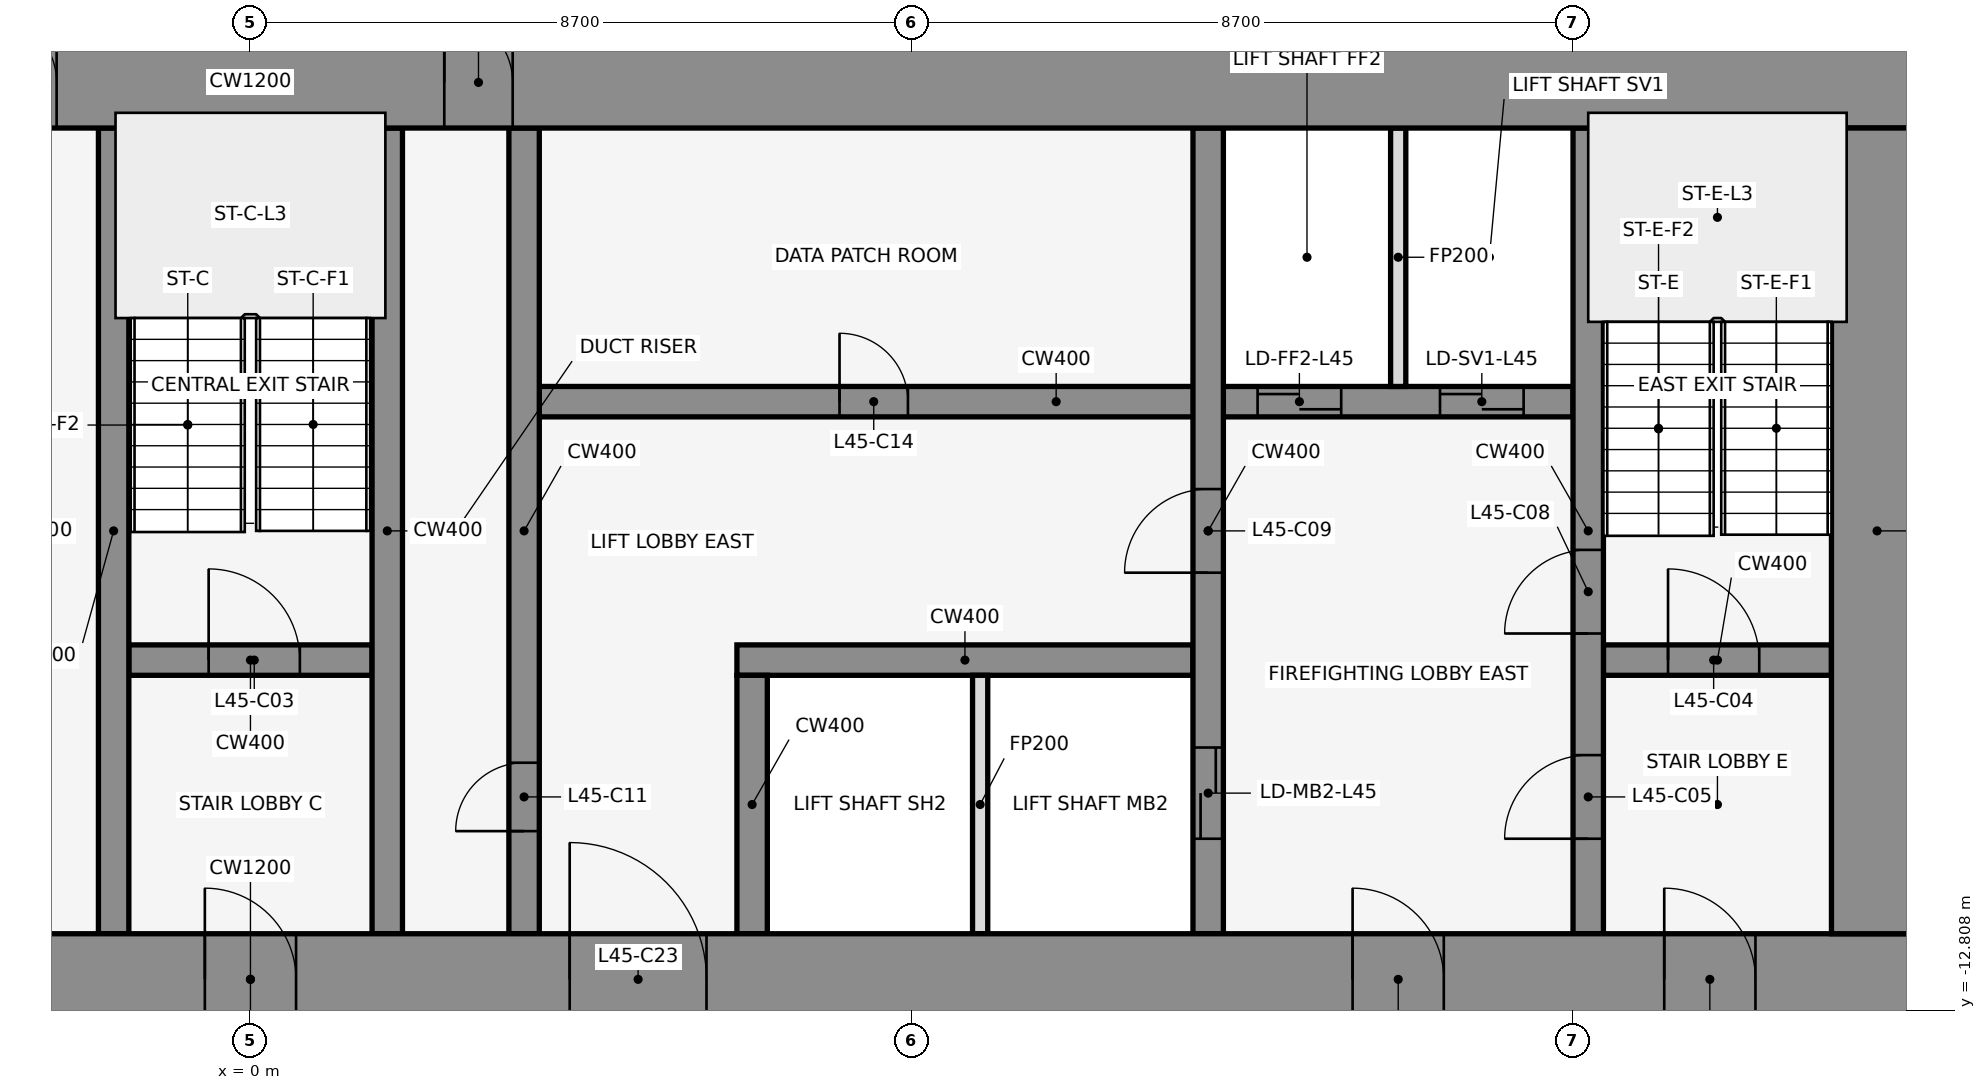
"""IFC4 building model, lengths in metres.
Left out: names, types, materials, properties, quantities, classifications, styles, units other than length and angle.
Written with IfcOpenShell. Run it as: python <this file> out.ifc"""

import sys

from ifc_helpers import new_model, si_unit, direction, frame, frame_2d, origin, place, context, subcontext, project, spatial, rectangle, extrude, element, fill, save


model = new_model("IFC4")
c1 = context("Model", 3, precision=1e-05, world=origin(), true_north=direction((0.0, 1.0)))
c2 = subcontext(c1, "Body", "Model", "MODEL_VIEW")
j1 = project(units=[si_unit("LENGTHUNIT", "METRE"), si_unit("PLANEANGLEUNIT", "RADIAN")], contexts=[c1])
p1 = place(None, origin())
s1 = spatial("IfcSite", under=j1, at=p1, CompositionType="ELEMENT")
p2 = place(p1, origin())
s2 = spatial("IfcBuilding", under=s1, at=p2, CompositionType="ELEMENT")
p3 = place(p2, frame((0.0, 0.0, 203.2)))
s3 = spatial("IfcBuildingStorey", under=s2, at=p3, CompositionType="ELEMENT", Elevation=203.2)
for number, where, z_axis, x_axis in (
    (1, (16.432, -0.105, 0.0), (0.0, 0.0, 1.0), (-0.84, 0.543, 0.0)),
    (2, (1.901, 1.08, 0.0), (0.0, 0.0, 1.0), (-0.84, -0.543, 0.0)),
    (3, (-0.068, -0.105, 0.0), (0.0, 0.0, 1.0), (-0.84, 0.543, 0.0)),
):
    element("IfcWall", number, at=place(p3, frame(where, z_axis=z_axis, x_axis=x_axis)), inside=s3, PredefinedType="STANDARD", context=c2, shape_type="SweptSolid", body=[
        extrude(rectangle(XDim=2.183, YDim=0.25, at=frame_2d((1.091, 0.0))), origin(), (0.0, 0.0, 1.0), 3.95),
    ])
p4 = place(p3, frame((-1.6, -8.2, 0.0), z_axis=(0.0, 0.0, 1.0), x_axis=(1.0, 0.0, 0.0)))
e4 = element("IfcWall", 4, at=p4, inside=s3, PredefinedType="SHEAR", context=c2, shape_type="SweptSolid", body=[
    extrude(rectangle(XDim=3.2, YDim=0.4, at=frame_2d((1.6, 0.0))), origin(), (0.0, 0.0, 1.0), 4.1),
])
p5 = place(p4, frame((1.05, 0.0, 0.0)))
e5 = element("IfcOpeningElement", 5, at=p5, cuts=e4, PredefinedType="OPENING", context=c2, shape_type="SweptSolid", body=[
    extrude(rectangle(XDim=1.2, YDim=2.1, at=frame_2d((0.6, 1.05))), frame((0.0, 0.212, 0.0), z_axis=(0.0, -1.0, 0.0), x_axis=(1.0, 0.0, 0.0)), (0.0, 0.0, 1.0), 0.424),
])
p6 = place(p3, frame((6.4, -8.2, 0.0), z_axis=(0.0, 0.0, 1.0), x_axis=(1.0, 0.0, 0.0)))
e6 = element("IfcWall", 6, at=p6, inside=s3, PredefinedType="SHEAR", context=c2, shape_type="SweptSolid", body=[
    extrude(rectangle(XDim=6.0, YDim=0.4, at=frame_2d((3.0, 0.0))), origin(), (0.0, 0.0, 1.0), 4.1),
])
p7 = place(p3, frame((17.8, -8.2, 0.0), z_axis=(0.0, 0.0, 1.0), x_axis=(1.0, 0.0, 0.0)))
e7 = element("IfcWall", 7, at=p7, inside=s3, PredefinedType="SHEAR", context=c2, shape_type="SweptSolid", body=[
    extrude(rectangle(XDim=3.0, YDim=0.4, at=frame_2d((1.5, 0.0))), origin(), (0.0, 0.0, 1.0), 4.1),
])
p8 = place(p7, frame((0.85, 0.0, 0.0)))
e8 = element("IfcOpeningElement", 8, at=p8, cuts=e7, PredefinedType="OPENING", context=c2, shape_type="SweptSolid", body=[
    extrude(rectangle(XDim=1.2, YDim=2.1, at=frame_2d((0.6, 1.05))), frame((0.0, 0.212, 0.0), z_axis=(0.0, -1.0, 0.0), x_axis=(1.0, 0.0, 0.0)), (0.0, 0.0, 1.0), 0.424),
])
p9 = place(p3, frame((3.8, -4.8, 0.0), z_axis=(0.0, 0.0, 1.0), x_axis=(1.0, 0.0, 0.0)))
e9 = element("IfcWall", 9, at=p9, inside=s3, PredefinedType="SHEAR", context=c2, shape_type="SweptSolid", body=[
    extrude(rectangle(XDim=13.6, YDim=0.4, at=frame_2d((6.8, 0.0))), origin(), (0.0, 0.0, 1.0), 4.1),
])
p10 = place(p9, frame((9.45, 0.0, 0.0)))
e10 = element("IfcOpeningElement", 10, at=p10, cuts=e9, PredefinedType="OPENING", context=c2, shape_type="SweptSolid", body=[
    extrude(rectangle(XDim=1.1, YDim=2.1, at=frame_2d((0.55, 1.05))), frame((0.0, 0.212, 0.0), z_axis=(0.0, -1.0, 0.0), x_axis=(1.0, 0.0, 0.0)), (0.0, 0.0, 1.0), 0.424),
])
p11 = place(p9, frame((11.85, 0.0, 0.0)))
e11 = element("IfcOpeningElement", 11, at=p11, cuts=e9, PredefinedType="OPENING", context=c2, shape_type="SweptSolid", body=[
    extrude(rectangle(XDim=1.1, YDim=2.1, at=frame_2d((0.55, 1.05))), frame((0.0, 0.212, 0.0), z_axis=(0.0, -1.0, 0.0), x_axis=(1.0, 0.0, 0.0)), (0.0, 0.0, 1.0), 0.424),
])
p12 = place(p9, frame((3.95, 0.0, 0.0)))
e12 = element("IfcOpeningElement", 12, at=p12, cuts=e9, PredefinedType="OPENING", context=c2, shape_type="SweptSolid", body=[
    extrude(rectangle(XDim=0.9, YDim=2.1, at=frame_2d((0.45, 1.05))), frame((0.0, 0.212, 0.0), z_axis=(0.0, -1.0, 0.0), x_axis=(1.0, 0.0, 0.0)), (0.0, 0.0, 1.0), 0.424),
])
for number, where, z_axis, x_axis in (
    (13, (-1.8, -11.8, 0.0), (0.0, 0.0, 1.0), (0.0, 1.0, 0.0)),
    (14, (1.8, -11.8, 0.0), (0.0, 0.0, 1.0), (0.0, 1.0, 0.0)),
):
    element("IfcWall", number, at=place(p3, frame(where, z_axis=z_axis, x_axis=x_axis)), inside=s3, PredefinedType="SHEAR", context=c2, shape_type="SweptSolid", body=[
        extrude(rectangle(XDim=10.6, YDim=0.4, at=frame_2d((5.3, 0.0))), origin(), (0.0, 0.0, 1.0), 4.1),
    ])
p13 = place(p3, frame((3.6, -11.8, 0.0), z_axis=(0.0, 0.0, 1.0), x_axis=(0.0, 1.0, 0.0)))
e15 = element("IfcWall", 15, at=p13, inside=s3, PredefinedType="SHEAR", context=c2, shape_type="SweptSolid", body=[
    extrude(rectangle(XDim=10.6, YDim=0.4, at=frame_2d((5.3, 0.0))), origin(), (0.0, 0.0, 1.0), 4.1),
])
p14 = place(p13, frame((1.35, 0.0, 0.0)))
e16 = element("IfcOpeningElement", 16, at=p14, cuts=e15, PredefinedType="OPENING", context=c2, shape_type="SweptSolid", body=[
    extrude(rectangle(XDim=0.9, YDim=2.1, at=frame_2d((0.45, 1.05))), frame((0.0, 0.212, 0.0), z_axis=(0.0, -1.0, 0.0), x_axis=(1.0, 0.0, 0.0)), (0.0, 0.0, 1.0), 0.424),
])
p15 = place(p3, frame((6.6, -11.8, 0.0), z_axis=(0.0, 0.0, 1.0), x_axis=(0.0, 1.0, 0.0)))
e17 = element("IfcWall", 17, at=p15, inside=s3, PredefinedType="SHEAR", context=c2, shape_type="SweptSolid", body=[
    extrude(rectangle(XDim=3.4, YDim=0.4, at=frame_2d((1.7, 0.0))), origin(), (0.0, 0.0, 1.0), 4.1),
])
p16 = place(p3, frame((9.6, -11.8, 0.0), z_axis=(0.0, 0.0, 1.0), x_axis=(0.0, 1.0, 0.0)))
e18 = element("IfcWall", 18, at=p16, inside=s3, PredefinedType="PARTITIONING", context=c2, shape_type="SweptSolid", body=[
    extrude(rectangle(XDim=3.4, YDim=0.2, at=frame_2d((1.7, 0.0))), origin(), (0.0, 0.0, 1.0), 2.84),
])
p17 = place(p3, frame((12.6, -11.8, 0.0), z_axis=(0.0, 0.0, 1.0), x_axis=(0.0, 1.0, 0.0)))
e19 = element("IfcWall", 19, at=p17, inside=s3, PredefinedType="SHEAR", context=c2, shape_type="SweptSolid", body=[
    extrude(rectangle(XDim=10.6, YDim=0.4, at=frame_2d((5.3, 0.0))), origin(), (0.0, 0.0, 1.0), 4.1),
])
p18 = place(p17, frame((1.25, 0.0, 0.0)))
e20 = element("IfcOpeningElement", 20, at=p18, cuts=e19, PredefinedType="OPENING", context=c2, shape_type="SweptSolid", body=[
    extrude(rectangle(XDim=1.2, YDim=2.1, at=frame_2d((0.6, 1.05))), frame((0.0, 0.212, 0.0), z_axis=(0.0, -1.0, 0.0), x_axis=(1.0, 0.0, 0.0)), (0.0, 0.0, 1.0), 0.424),
])
p19 = place(p17, frame((4.75, 0.0, 0.0)))
e21 = element("IfcOpeningElement", 21, at=p19, cuts=e19, PredefinedType="OPENING", context=c2, shape_type="SweptSolid", body=[
    extrude(rectangle(XDim=1.1, YDim=2.1, at=frame_2d((0.55, 1.05))), frame((0.0, 0.212, 0.0), z_axis=(0.0, -1.0, 0.0), x_axis=(1.0, 0.0, 0.0)), (0.0, 0.0, 1.0), 0.424),
])
p20 = place(p3, frame((15.1, -4.6, 0.0), z_axis=(0.0, 0.0, 1.0), x_axis=(0.0, 1.0, 0.0)))
e22 = element("IfcWall", 22, at=p20, inside=s3, PredefinedType="PARTITIONING", context=c2, shape_type="SweptSolid", body=[
    extrude(rectangle(XDim=3.4, YDim=0.2, at=frame_2d((1.7, 0.0))), origin(), (0.0, 0.0, 1.0), 2.84),
])
p21 = place(p3, frame((17.6, -11.8, 0.0), z_axis=(0.0, 0.0, 1.0), x_axis=(0.0, 1.0, 0.0)))
e23 = element("IfcWall", 23, at=p21, inside=s3, PredefinedType="SHEAR", context=c2, shape_type="SweptSolid", body=[
    extrude(rectangle(XDim=10.6, YDim=0.4, at=frame_2d((5.3, 0.0))), origin(), (0.0, 0.0, 1.0), 4.1),
])
p22 = place(p21, frame((1.25, 0.0, 0.0)))
e24 = element("IfcOpeningElement", 24, at=p22, cuts=e23, PredefinedType="OPENING", context=c2, shape_type="SweptSolid", body=[
    extrude(rectangle(XDim=1.1, YDim=2.1, at=frame_2d((0.55, 1.05))), frame((0.0, 0.212, 0.0), z_axis=(0.0, -1.0, 0.0), x_axis=(1.0, 0.0, 0.0)), (0.0, 0.0, 1.0), 0.424),
])
p23 = place(p21, frame((3.95, 0.0, 0.0)))
e25 = element("IfcOpeningElement", 25, at=p23, cuts=e23, PredefinedType="OPENING", context=c2, shape_type="SweptSolid", body=[
    extrude(rectangle(XDim=1.1, YDim=2.1, at=frame_2d((0.55, 1.05))), frame((0.0, 0.212, 0.0), z_axis=(0.0, -1.0, 0.0), x_axis=(1.0, 0.0, 0.0)), (0.0, 0.0, 1.0), 0.424),
])
p24 = place(p3, frame((-22.0, -0.6, 0.0), z_axis=(0.0, 0.0, 1.0), x_axis=(1.0, 0.0, 0.0)))
e26 = element("IfcWall", 26, at=p24, inside=s3, PredefinedType="SHEAR", context=c2, shape_type="SweptSolid", body=[
    extrude(rectangle(XDim=44.0, YDim=1.2, at=frame_2d((22.0, 0.0))), origin(), (0.0, 0.0, 1.0), 4.1),
])
p25 = place(p24, frame((18.55, 0.0, 0.0)))
e27 = element("IfcOpeningElement", 27, at=p25, cuts=e26, PredefinedType="OPENING", context=c2, shape_type="SweptSolid", body=[
    extrude(rectangle(XDim=0.9, YDim=2.1, at=frame_2d((0.45, 1.05))), frame((0.0, 0.612, 0.0), z_axis=(0.0, -1.0, 0.0), x_axis=(1.0, 0.0, 0.0)), (0.0, 0.0, 1.0), 1.224),
])
p26 = place(p24, frame((24.55, 0.0, 0.0)))
e28 = element("IfcOpeningElement", 28, at=p26, cuts=e26, PredefinedType="OPENING", context=c2, shape_type="SweptSolid", body=[
    extrude(rectangle(XDim=0.9, YDim=2.1, at=frame_2d((0.45, 1.05))), frame((0.0, 0.612, 0.0), z_axis=(0.0, -1.0, 0.0), x_axis=(1.0, 0.0, 0.0)), (0.0, 0.0, 1.0), 1.224),
])
p27 = place(p3, frame((-22.0, -12.4, 0.0), z_axis=(0.0, 0.0, 1.0), x_axis=(1.0, 0.0, 0.0)))
e29 = element("IfcWall", 29, at=p27, inside=s3, PredefinedType="SHEAR", context=c2, shape_type="SweptSolid", body=[
    extrude(rectangle(XDim=44.0, YDim=1.2, at=frame_2d((22.0, 0.0))), origin(), (0.0, 0.0, 1.0), 4.1),
])
p28 = place(p27, frame((2.2, 0.0, 0.0)))
e30 = element("IfcOpeningElement", 30, at=p28, cuts=e29, PredefinedType="OPENING", context=c2, shape_type="SweptSolid", body=[
    extrude(rectangle(XDim=1.2, YDim=2.1, at=frame_2d((0.6, 1.05))), frame((0.0, 0.612, 0.0), z_axis=(0.0, -1.0, 0.0), x_axis=(1.0, 0.0, 0.0)), (0.0, 0.0, 1.0), 1.224),
])
p29 = place(p27, frame((21.4, 0.0, 0.0)))
e31 = element("IfcOpeningElement", 31, at=p29, cuts=e29, PredefinedType="OPENING", context=c2, shape_type="SweptSolid", body=[
    extrude(rectangle(XDim=1.2, YDim=2.1, at=frame_2d((0.6, 1.05))), frame((0.0, 0.612, 0.0), z_axis=(0.0, -1.0, 0.0), x_axis=(1.0, 0.0, 0.0)), (0.0, 0.0, 1.0), 1.224),
])
p30 = place(p27, frame((40.6, 0.0, 0.0)))
e32 = element("IfcOpeningElement", 32, at=p30, cuts=e29, PredefinedType="OPENING", context=c2, shape_type="SweptSolid", body=[
    extrude(rectangle(XDim=1.2, YDim=2.1, at=frame_2d((0.6, 1.05))), frame((0.0, 0.612, 0.0), z_axis=(0.0, -1.0, 0.0), x_axis=(1.0, 0.0, 0.0)), (0.0, 0.0, 1.0), 1.224),
])
p31 = place(p27, frame((16.0, 0.0, 0.0)))
e33 = element("IfcOpeningElement", 33, at=p31, cuts=e29, PredefinedType="OPENING", context=c2, shape_type="SweptSolid", body=[
    extrude(rectangle(XDim=1.8, YDim=2.1, at=frame_2d((0.9, 1.05))), frame((0.0, 0.612, 0.0), z_axis=(0.0, -1.0, 0.0), x_axis=(1.0, 0.0, 0.0)), (0.0, 0.0, 1.0), 1.224),
])
p32 = place(p27, frame((6.3, 0.0, 0.0)))
e34 = element("IfcOpeningElement", 34, at=p32, cuts=e29, PredefinedType="OPENING", context=c2, shape_type="SweptSolid", body=[
    extrude(rectangle(XDim=1.2, YDim=2.1, at=frame_2d((0.6, 1.05))), frame((0.0, 0.612, 0.0), z_axis=(0.0, -1.0, 0.0), x_axis=(1.0, 0.0, 0.0)), (0.0, 0.0, 1.0), 1.224),
])
p33 = place(p27, frame((26.2, 0.0, 0.0)))
e35 = element("IfcOpeningElement", 35, at=p33, cuts=e29, PredefinedType="OPENING", context=c2, shape_type="SweptSolid", body=[
    extrude(rectangle(XDim=1.8, YDim=2.1, at=frame_2d((0.9, 1.05))), frame((0.0, 0.612, 0.0), z_axis=(0.0, -1.0, 0.0), x_axis=(1.0, 0.0, 0.0)), (0.0, 0.0, 1.0), 1.224),
])
p34 = place(p27, frame((36.5, 0.0, 0.0)))
e36 = element("IfcOpeningElement", 36, at=p34, cuts=e29, PredefinedType="OPENING", context=c2, shape_type="SweptSolid", body=[
    extrude(rectangle(XDim=1.2, YDim=2.1, at=frame_2d((0.6, 1.05))), frame((0.0, 0.612, 0.0), z_axis=(0.0, -1.0, 0.0), x_axis=(1.0, 0.0, 0.0)), (0.0, 0.0, 1.0), 1.224),
])
p35 = place(p3, frame((21.4, -11.8, 0.0), z_axis=(0.0, 0.0, 1.0), x_axis=(0.0, 1.0, 0.0)))
e37 = element("IfcWall", 37, at=p35, inside=s3, PredefinedType="SHEAR", context=c2, shape_type="SweptSolid", body=[
    extrude(rectangle(XDim=10.6, YDim=1.2, at=frame_2d((5.3, 0.0))), origin(), (0.0, 0.0, 1.0), 4.1),
])
p36 = place(p5, origin())
e38 = element("IfcDoor", 38, at=p36, inside=s3, OperationType="SINGLE_SWING_LEFT", PredefinedType="DOOR", context=c2, shape_type="SweptSolid", body=[
    extrude(rectangle(XDim=1.2, YDim=2.1, at=frame_2d((0.6, 1.05))), frame((0.0, 0.025, 0.0), z_axis=(0.0, -1.0, 0.0), x_axis=(1.0, 0.0, 0.0)), (0.0, 0.0, 1.0), 0.05),
])
fill(e5, e38)
p37 = place(p8, origin())
e39 = element("IfcDoor", 39, at=p37, inside=s3, OperationType="SINGLE_SWING_RIGHT", PredefinedType="DOOR", context=c2, shape_type="SweptSolid", body=[
    extrude(rectangle(XDim=1.2, YDim=2.1, at=frame_2d((0.6, 1.05))), frame((0.0, 0.025, 0.0), z_axis=(0.0, -1.0, 0.0), x_axis=(1.0, 0.0, 0.0)), (0.0, 0.0, 1.0), 0.05),
])
fill(e8, e39)
p38 = place(p22, origin())
e40 = element("IfcDoor", 40, at=p38, inside=s3, OperationType="SINGLE_SWING_LEFT", PredefinedType="DOOR", context=c2, shape_type="SweptSolid", body=[
    extrude(rectangle(XDim=1.1, YDim=2.1, at=frame_2d((0.55, 1.05))), frame((0.0, 0.025, 0.0), z_axis=(0.0, -1.0, 0.0), x_axis=(1.0, 0.0, 0.0)), (0.0, 0.0, 1.0), 0.05),
])
fill(e24, e40)
p39 = place(p18, origin())
e41 = element("IfcDoor", 41, at=p39, inside=s3, OperationType="DOUBLE_DOOR_SLIDING", PredefinedType="DOOR", context=c2, shape_type="SweptSolid", body=[
    extrude(rectangle(XDim=1.2, YDim=2.1, at=frame_2d((0.6, 1.05))), frame((0.0, 0.025, 0.0), z_axis=(0.0, -1.0, 0.0), x_axis=(1.0, 0.0, 0.0)), (0.0, 0.0, 1.0), 0.05),
])
fill(e20, e41)
p40 = place(p10, origin())
e42 = element("IfcDoor", 42, at=p40, inside=s3, OperationType="DOUBLE_DOOR_SLIDING", PredefinedType="DOOR", context=c2, shape_type="SweptSolid", body=[
    extrude(rectangle(XDim=1.1, YDim=2.1, at=frame_2d((0.55, 1.05))), frame((0.0, 0.025, 0.0), z_axis=(0.0, -1.0, 0.0), x_axis=(1.0, 0.0, 0.0)), (0.0, 0.0, 1.0), 0.05),
])
fill(e10, e42)
p41 = place(p11, origin())
e43 = element("IfcDoor", 43, at=p41, inside=s3, OperationType="DOUBLE_DOOR_SLIDING", PredefinedType="DOOR", context=c2, shape_type="SweptSolid", body=[
    extrude(rectangle(XDim=1.1, YDim=2.1, at=frame_2d((0.55, 1.05))), frame((0.0, 0.025, 0.0), z_axis=(0.0, -1.0, 0.0), x_axis=(1.0, 0.0, 0.0)), (0.0, 0.0, 1.0), 0.05),
])
fill(e11, e43)
p42 = place(p23, origin())
e44 = element("IfcDoor", 44, at=p42, inside=s3, OperationType="SINGLE_SWING_RIGHT", PredefinedType="DOOR", context=c2, shape_type="SweptSolid", body=[
    extrude(rectangle(XDim=1.1, YDim=2.1, at=frame_2d((0.55, 1.05))), frame((0.0, 0.025, 0.0), z_axis=(0.0, -1.0, 0.0), x_axis=(1.0, 0.0, 0.0)), (0.0, 0.0, 1.0), 0.05),
])
fill(e25, e44)
p43 = place(p19, frame((1.1, 0.0, 0.0), z_axis=(0.0, 0.0, 1.0), x_axis=(-1.0, 0.0, 0.0)))
e45 = element("IfcDoor", 45, at=p43, inside=s3, OperationType="SINGLE_SWING_RIGHT", PredefinedType="DOOR", context=c2, shape_type="SweptSolid", body=[
    extrude(rectangle(XDim=1.1, YDim=2.1, at=frame_2d((0.55, 1.05))), frame((0.0, 0.025, 0.0), z_axis=(0.0, -1.0, 0.0), x_axis=(1.0, 0.0, 0.0)), (0.0, 0.0, 1.0), 0.05),
])
fill(e21, e45)
p44 = place(p14, origin())
e46 = element("IfcDoor", 46, at=p44, inside=s3, OperationType="SINGLE_SWING_LEFT", PredefinedType="DOOR", context=c2, shape_type="SweptSolid", body=[
    extrude(rectangle(XDim=0.9, YDim=2.1, at=frame_2d((0.45, 1.05))), frame((0.0, 0.025, 0.0), z_axis=(0.0, -1.0, 0.0), x_axis=(1.0, 0.0, 0.0)), (0.0, 0.0, 1.0), 0.05),
])
fill(e16, e46)
p45 = place(p12, origin())
e47 = element("IfcDoor", 47, at=p45, inside=s3, OperationType="SINGLE_SWING_RIGHT", PredefinedType="DOOR", context=c2, shape_type="SweptSolid", body=[
    extrude(rectangle(XDim=0.9, YDim=2.1, at=frame_2d((0.45, 1.05))), frame((0.0, 0.025, 0.0), z_axis=(0.0, -1.0, 0.0), x_axis=(1.0, 0.0, 0.0)), (0.0, 0.0, 1.0), 0.05),
])
fill(e12, e47)
p46 = place(p25, origin())
e48 = element("IfcDoor", 48, at=p46, inside=s3, OperationType="SINGLE_SWING_LEFT", PredefinedType="DOOR", context=c2, shape_type="SweptSolid", body=[
    extrude(rectangle(XDim=0.9, YDim=2.1, at=frame_2d((0.45, 1.05))), frame((0.0, 0.025, 0.0), z_axis=(0.0, -1.0, 0.0), x_axis=(1.0, 0.0, 0.0)), (0.0, 0.0, 1.0), 0.05),
])
fill(e27, e48)
p47 = place(p26, origin())
e49 = element("IfcDoor", 49, at=p47, inside=s3, OperationType="SINGLE_SWING_LEFT", PredefinedType="DOOR", context=c2, shape_type="SweptSolid", body=[
    extrude(rectangle(XDim=0.9, YDim=2.1, at=frame_2d((0.45, 1.05))), frame((0.0, 0.025, 0.0), z_axis=(0.0, -1.0, 0.0), x_axis=(1.0, 0.0, 0.0)), (0.0, 0.0, 1.0), 0.05),
])
fill(e28, e49)
p48 = place(p29, frame((1.2, 0.0, 0.0), z_axis=(0.0, 0.0, 1.0), x_axis=(-1.0, 0.0, 0.0)))
e50 = element("IfcDoor", 50, at=p48, inside=s3, OperationType="SINGLE_SWING_RIGHT", PredefinedType="DOOR", context=c2, shape_type="SweptSolid", body=[
    extrude(rectangle(XDim=1.2, YDim=2.1, at=frame_2d((0.6, 1.05))), frame((0.0, 0.025, 0.0), z_axis=(0.0, -1.0, 0.0), x_axis=(1.0, 0.0, 0.0)), (0.0, 0.0, 1.0), 0.05),
])
fill(e31, e50)
p49 = place(p30, frame((1.2, 0.0, 0.0), z_axis=(0.0, 0.0, 1.0), x_axis=(-1.0, 0.0, 0.0)))
e51 = element("IfcDoor", 51, at=p49, inside=s3, OperationType="SINGLE_SWING_RIGHT", PredefinedType="DOOR", context=c2, shape_type="SweptSolid", body=[
    extrude(rectangle(XDim=1.2, YDim=2.1, at=frame_2d((0.6, 1.05))), frame((0.0, 0.025, 0.0), z_axis=(0.0, -1.0, 0.0), x_axis=(1.0, 0.0, 0.0)), (0.0, 0.0, 1.0), 0.05),
])
fill(e32, e51)
p50 = place(p33, origin())
e52 = element("IfcDoor", 52, at=p50, inside=s3, OperationType="SINGLE_SWING_LEFT", PredefinedType="DOOR", context=c2, shape_type="SweptSolid", body=[
    extrude(rectangle(XDim=1.8, YDim=2.1, at=frame_2d((0.9, 1.05))), frame((0.0, 0.025, 0.0), z_axis=(0.0, -1.0, 0.0), x_axis=(1.0, 0.0, 0.0)), (0.0, 0.0, 1.0), 0.05),
])
fill(e35, e52)
p51 = place(p34, frame((1.2, 0.0, 0.0), z_axis=(0.0, 0.0, 1.0), x_axis=(-1.0, 0.0, 0.0)))
e53 = element("IfcDoor", 53, at=p51, inside=s3, OperationType="SINGLE_SWING_RIGHT", PredefinedType="DOOR", context=c2, shape_type="SweptSolid", body=[
    extrude(rectangle(XDim=1.2, YDim=2.1, at=frame_2d((0.6, 1.05))), frame((0.0, 0.025, 0.0), z_axis=(0.0, -1.0, 0.0), x_axis=(1.0, 0.0, 0.0)), (0.0, 0.0, 1.0), 0.05),
])
fill(e36, e53)
save(model, sys.argv[1])
